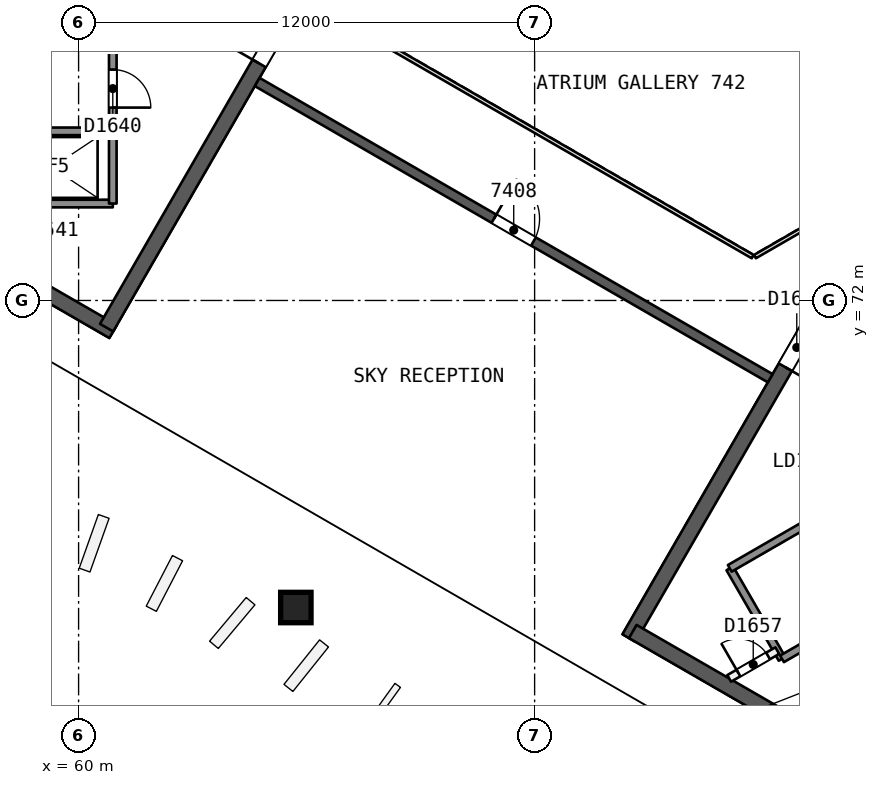
"""IFC4 building model, lengths in metres.
Left out: names, types, materials, properties, quantities, classifications, styles, units other than length and angle.
Written with IfcOpenShell. Run it as: python <this file> out.ifc"""

import sys

from ifc_helpers import new_model, si_unit, direction, frame, frame_2d, origin, origin_2d, place, context, subcontext, project, spatial, rectangle, extrude, element, fill, save


model = new_model("IFC4")
c1 = context("Model", 3, precision=1e-05, world=origin(), true_north=direction((0.0, 1.0)))
c2 = subcontext(c1, "Body", "Model", "MODEL_VIEW")
j1 = project(units=[si_unit("LENGTHUNIT", "METRE"), si_unit("PLANEANGLEUNIT", "RADIAN")], contexts=[c1])
p1 = place(None, origin())
s1 = spatial("IfcSite", under=j1, at=p1, CompositionType="ELEMENT")
p2 = place(p1, origin())
s2 = spatial("IfcBuilding", under=s1, at=p2, CompositionType="ELEMENT")
p3 = place(p2, frame((0.0, 0.0, 300.4)))
s3 = spatial("IfcBuildingStorey", under=s2, at=p3, CompositionType="ELEMENT", Elevation=300.4)
p4 = place(p3, frame((48.597, 78.293, 0.0), z_axis=(0.0, 0.0, 1.0), x_axis=(0.866026024469, -0.499998924941, 0.0)))
e1 = element("IfcWall", 1, at=p4, inside=s3, PredefinedType="SHEAR", context=c2, shape_type="SweptSolid", body=[
    extrude(rectangle(XDim=14.218, YDim=0.4, at=frame_2d((7.109, 0.0))), origin(), (0.0, 0.0, 1.0), 4.4),
])
p5 = place(p3, frame((60.737, 71.284, 0.0), z_axis=(0.0, 0.0, 1.0), x_axis=(0.50000547566, 0.866022242388, 0.0)))
e2 = element("IfcWall", 2, at=p5, inside=s3, PredefinedType="SHEAR", context=c2, shape_type="SweptSolid", body=[
    extrude(rectangle(XDim=10.18, YDim=0.4, at=frame_2d((5.09, 0.0))), origin(), (0.0, 0.0, 1.0), 4.4),
])
p6 = place(p5, frame((8.03, 0.0, 0.0)))
e3 = element("IfcOpeningElement", 3, at=p6, cuts=e2, PredefinedType="OPENING", context=c2, shape_type="SweptSolid", body=[
    extrude(rectangle(XDim=1.2, YDim=2.1, at=frame_2d((0.6, 1.05))), frame((0.0, 0.21, 0.0), z_axis=(0.0, -1.0, 0.0), x_axis=(1.0, 0.0, 0.0)), (0.0, 0.0, 1.0), 0.421),
])
p7 = place(p3, frame((79.615, 72.006, 0.0), z_axis=(0.0, 0.0, 1.0), x_axis=(-0.50000177223, -0.866024380585, 0.0)))
e4 = element("IfcWall", 4, at=p7, inside=s3, PredefinedType="SHEAR", context=c2, shape_type="SweptSolid", body=[
    extrude(rectangle(XDim=10.265, YDim=0.4, at=frame_2d((5.132, 0.0))), origin(), (0.0, 0.0, 1.0), 4.4),
])
p8 = place(p7, frame((0.834, 0.0, 0.0)))
e5 = element("IfcOpeningElement", 5, at=p8, cuts=e4, PredefinedType="OPENING", context=c2, shape_type="SweptSolid", body=[
    extrude(rectangle(XDim=1.2, YDim=2.1, at=frame_2d((0.6, 1.05))), frame((0.0, 0.21, 0.0), z_axis=(0.0, -1.0, 0.0), x_axis=(1.0, 0.0, 0.0)), (0.0, 0.0, 1.0), 0.421),
])
p9 = place(p3, frame((74.583, 63.29, 0.0), z_axis=(0.0, 0.0, 1.0), x_axis=(0.866024494188, -0.500001575463, 0.0)))
e6 = element("IfcWall", 6, at=p9, inside=s3, PredefinedType="SHEAR", context=c2, shape_type="SweptSolid", body=[
    extrude(rectangle(XDim=14.133, YDim=0.4, at=frame_2d((7.067, 0.0))), origin(), (0.0, 0.0, 1.0), 4.4),
])
p10 = place(p3, frame((64.7, 77.748, 0.0), z_axis=(0.0, 0.0, 1.0), x_axis=(0.866026492143, -0.499998114903, 0.0)))
e7 = element("IfcWall", 7, at=p10, inside=s3, PredefinedType="SHEAR", context=c2, shape_type="SweptSolid", body=[
    extrude(rectangle(XDim=15.588, YDim=0.25, at=frame_2d((7.794, 0.0))), origin(), (0.0, 0.0, 1.0), 4.0),
])
p11 = place(p10, frame((7.194, 0.0, 0.0)))
e8 = element("IfcOpeningElement", 8, at=p11, cuts=e7, PredefinedType="OPENING", context=c2, shape_type="SweptSolid", body=[
    extrude(rectangle(XDim=1.2, YDim=2.4, at=frame_2d((0.6, 1.2))), frame((0.0, 0.135, 0.0), z_axis=(0.0, -1.0, 0.0), x_axis=(1.0, 0.0, 0.0)), (0.0, 0.0, 1.0), 0.271),
])
p12 = place(p3, frame((65.705, 63.9, 0.0), z_axis=(0.010096151254, 0.017474107939, 0.999796340902), x_axis=(-0.865867238205, 0.500273850809, 8.7352e-08)))
e9 = element("IfcColumn", 9, at=p12, inside=s3, PredefinedType="COLUMN", context=c2, shape_type="SweptSolid", body=[
    extrude(rectangle(XDim=0.8, YDim=0.8, at=origin_2d()), origin(), (0.0, 0.0, 1.0), 4.401),
])
for number, where, z_axis, x_axis in (
    (10, (60.9, 76.45, 0.0), (0.0, 0.0, 1.0), (-1.0, 0.0, 0.0)),
    (11, (60.9, 74.55, 0.0), (0.0, 0.0, 1.0), (-1.0, 0.0, 0.0)),
):
    element("IfcWall", number, at=place(p3, frame(where, z_axis=z_axis, x_axis=x_axis)), inside=s3, PredefinedType="SOLIDWALL", context=c2, shape_type="SweptSolid", body=[
        extrude(rectangle(XDim=3.05, YDim=0.2, at=frame_2d((1.525, 0.0))), origin(), (0.0, 0.0, 1.0), 4.0),
    ])
p13 = place(p3, frame((60.9, 85.45, 0.0), z_axis=(0.0, 0.0, 1.0), x_axis=(0.0, -1.0, 0.0)))
e12 = element("IfcWall", 12, at=p13, inside=s3, PredefinedType="SOLIDWALL", context=c2, shape_type="SweptSolid", body=[
    extrude(rectangle(XDim=10.9, YDim=0.2, at=frame_2d((5.45, 0.0))), origin(), (0.0, 0.0, 1.0), 4.0),
])
p14 = place(p13, frame((1.75, 0.0, 0.0)))
e13 = element("IfcOpeningElement", 13, at=p14, cuts=e12, PredefinedType="OPENING", context=c2, shape_type="SweptSolid", body=[
    extrude(rectangle(XDim=1.0, YDim=2.1, at=frame_2d((0.5, 1.05))), frame((0.0, 0.11, 0.0), z_axis=(0.0, -1.0, 0.0), x_axis=(1.0, 0.0, 0.0)), (0.0, 0.0, 1.0), 0.221),
])
p15 = place(p13, frame((5.125, 0.0, 0.0)))
e14 = element("IfcOpeningElement", 14, at=p15, cuts=e12, PredefinedType="OPENING", context=c2, shape_type="SweptSolid", body=[
    extrude(rectangle(XDim=1.0, YDim=2.1, at=frame_2d((0.5, 1.05))), frame((0.0, 0.11, 0.0), z_axis=(0.0, -1.0, 0.0), x_axis=(1.0, 0.0, 0.0)), (0.0, 0.0, 1.0), 0.221),
])
p16 = place(p13, frame((7.375, 0.0, 0.0)))
e15 = element("IfcOpeningElement", 15, at=p16, cuts=e12, PredefinedType="OPENING", context=c2, shape_type="SweptSolid", body=[
    extrude(rectangle(XDim=1.0, YDim=2.1, at=frame_2d((0.5, 1.05))), frame((0.0, 0.11, 0.0), z_axis=(0.0, -1.0, 0.0), x_axis=(1.0, 0.0, 0.0)), (0.0, 0.0, 1.0), 0.221),
])
p17 = place(p3, frame((77.135, 64.952, 0.0), z_axis=(0.0, 0.0, 1.0), x_axis=(0.499996545922, -0.866027397988, 0.0)))
e16 = element("IfcWall", 16, at=p17, inside=s3, PredefinedType="SOLIDWALL", context=c2, shape_type="SweptSolid", body=[
    extrude(rectangle(XDim=2.75, YDim=0.2, at=frame_2d((1.375, 0.0))), origin(), (0.0, 0.0, 1.0), 4.0),
])
p18 = place(p3, frame((77.135, 64.952, 0.0), z_axis=(0.0, 0.0, 1.0), x_axis=(0.866031916153, 0.499988720078, 0.0)))
e17 = element("IfcWall", 17, at=p18, inside=s3, PredefinedType="SOLIDWALL", context=c2, shape_type="SweptSolid", body=[
    extrude(rectangle(XDim=11.35, YDim=0.2, at=frame_2d((5.675, 0.0))), origin(), (0.0, 0.0, 1.0), 4.0),
])
p19 = place(p18, frame((2.875, 0.0, 0.0)))
e18 = element("IfcOpeningElement", 18, at=p19, cuts=e17, PredefinedType="OPENING", context=c2, shape_type="SweptSolid", body=[
    extrude(rectangle(XDim=1.1, YDim=2.1, at=frame_2d((0.55, 1.05))), frame((0.0, 0.11, 0.0), z_axis=(0.0, -1.0, 0.0), x_axis=(1.0, 0.0, 0.0)), (0.0, 0.0, 1.0), 0.221),
])
p20 = place(p18, frame((5.125, 0.0, 0.0)))
e19 = element("IfcOpeningElement", 19, at=p20, cuts=e17, PredefinedType="OPENING", context=c2, shape_type="SweptSolid", body=[
    extrude(rectangle(XDim=1.1, YDim=2.1, at=frame_2d((0.55, 1.05))), frame((0.0, 0.11, 0.0), z_axis=(0.0, -1.0, 0.0), x_axis=(1.0, 0.0, 0.0)), (0.0, 0.0, 1.0), 0.221),
])
p21 = place(p18, frame((7.375, 0.0, 0.0)))
e20 = element("IfcOpeningElement", 20, at=p21, cuts=e17, PredefinedType="OPENING", context=c2, shape_type="SweptSolid", body=[
    extrude(rectangle(XDim=1.1, YDim=2.1, at=frame_2d((0.55, 1.05))), frame((0.0, 0.11, 0.0), z_axis=(0.0, -1.0, 0.0), x_axis=(1.0, 0.0, 0.0)), (0.0, 0.0, 1.0), 0.221),
])
p22 = place(p3, frame((77.12, 62.056, 0.0), z_axis=(0.0, 0.0, 1.0), x_axis=(0.866054810376, 0.49994906283, 0.0)))
e21 = element("IfcWall", 21, at=p22, inside=s3, PredefinedType="PARTITIONING", context=c2, shape_type="SweptSolid", body=[
    extrude(rectangle(XDim=1.461, YDim=0.2, at=frame_2d((0.73, 0.0))), origin(), (0.0, 0.0, 1.0), 4.0),
])
p23 = place(p22, frame((0.281, 0.0, 0.0)))
e22 = element("IfcOpeningElement", 22, at=p23, cuts=e21, PredefinedType="OPENING", context=c2, shape_type="SweptSolid", body=[
    extrude(rectangle(XDim=0.9, YDim=2.1, at=frame_2d((0.45, 1.05))), frame((0.0, 0.11, 0.0), z_axis=(0.0, -1.0, 0.0), x_axis=(1.0, 0.0, 0.0)), (0.0, 0.0, 1.0), 0.221),
])
p24 = place(p3, frame((78.51, 62.57, 0.0), z_axis=(0.0, 0.0, 1.0), x_axis=(0.866053019151, 0.499952165731, 0.0)))
e23 = element("IfcWall", 23, at=p24, inside=s3, PredefinedType="SOLIDWALL", context=c2, shape_type="SweptSolid", body=[
    extrude(rectangle(XDim=2.3, YDim=0.2, at=frame_2d((1.15, 0.0))), origin(), (0.0, 0.0, 1.0), 4.0),
])
p25 = place(p3, frame((67.702, 78.948, 0.0), z_axis=(0.0, 0.0, 1.0), x_axis=(0.866026658274, -0.499997827154, 0.0)))
e24 = element("IfcWall", 24, at=p25, inside=s3, PredefinedType="PARTITIONING", context=c2, shape_type="SweptSolid", body=[
    extrude(rectangle(XDim=11.588, YDim=0.1, at=frame_2d((5.794, 0.0))), origin(), (0.0, 0.0, 1.0), 4.0),
])
p26 = place(p3, frame((77.798, 73.154, 0.0), z_axis=(0.0, 0.0, 1.0), x_axis=(0.866041268327, 0.499972520799, 0.0)))
e25 = element("IfcWall", 25, at=p26, inside=s3, PredefinedType="PARTITIONING", context=c2, shape_type="SweptSolid", body=[
    extrude(rectangle(XDim=2.0, YDim=0.1, at=frame_2d((1.0, 0.0))), origin(), (0.0, 0.0, 1.0), 4.0),
])
p27 = place(p11, origin())
e26 = element("IfcDoor", 26, at=p27, inside=s3, OperationType="SINGLE_SWING_LEFT", PredefinedType="NOTDEFINED", context=c2, shape_type="SweptSolid", body=[
    extrude(rectangle(XDim=1.2, YDim=2.4, at=frame_2d((0.6, 1.2))), frame((0.0, 0.025, 0.0), z_axis=(0.0, -1.0, 0.0), x_axis=(1.0, 0.0, 0.0)), (0.0, 0.0, 1.0), 0.05),
])
fill(e8, e26)
p28 = place(p6, origin())
e27 = element("IfcDoor", 27, at=p28, inside=s3, OperationType="SINGLE_SWING_LEFT", PredefinedType="NOTDEFINED", context=c2, shape_type="SweptSolid", body=[
    extrude(rectangle(XDim=1.2, YDim=2.1, at=frame_2d((0.6, 1.05))), frame((0.0, 0.025, 0.0), z_axis=(0.0, -1.0, 0.0), x_axis=(1.0, 0.0, 0.0)), (0.0, 0.0, 1.0), 0.05),
])
fill(e3, e27)
p29 = place(p16, origin())
e28 = element("IfcDoor", 28, at=p29, inside=s3, OperationType="SINGLE_SWING_RIGHT", PredefinedType="NOTDEFINED", context=c2, shape_type="SweptSolid", body=[
    extrude(rectangle(XDim=1.0, YDim=2.1, at=frame_2d((0.5, 1.05))), frame((0.0, 0.025, 0.0), z_axis=(0.0, -1.0, 0.0), x_axis=(1.0, 0.0, 0.0)), (0.0, 0.0, 1.0), 0.05),
])
fill(e15, e28)
p30 = place(p8, origin())
e29 = element("IfcDoor", 29, at=p30, inside=s3, OperationType="SINGLE_SWING_RIGHT", PredefinedType="NOTDEFINED", context=c2, shape_type="SweptSolid", body=[
    extrude(rectangle(XDim=1.2, YDim=2.1, at=frame_2d((0.6, 1.05))), frame((0.0, 0.025, 0.0), z_axis=(0.0, -1.0, 0.0), x_axis=(1.0, 0.0, 0.0)), (0.0, 0.0, 1.0), 0.05),
])
fill(e5, e29)
p31 = place(p23, origin())
e30 = element("IfcDoor", 30, at=p31, inside=s3, OperationType="SINGLE_SWING_LEFT", PredefinedType="NOTDEFINED", context=c2, shape_type="SweptSolid", body=[
    extrude(rectangle(XDim=0.9, YDim=2.1, at=frame_2d((0.45, 1.05))), frame((0.0, 0.025, 0.0), z_axis=(0.0, -1.0, 0.0), x_axis=(1.0, 0.0, 0.0)), (0.0, 0.0, 1.0), 0.05),
])
fill(e22, e30)
save(model, sys.argv[1])
